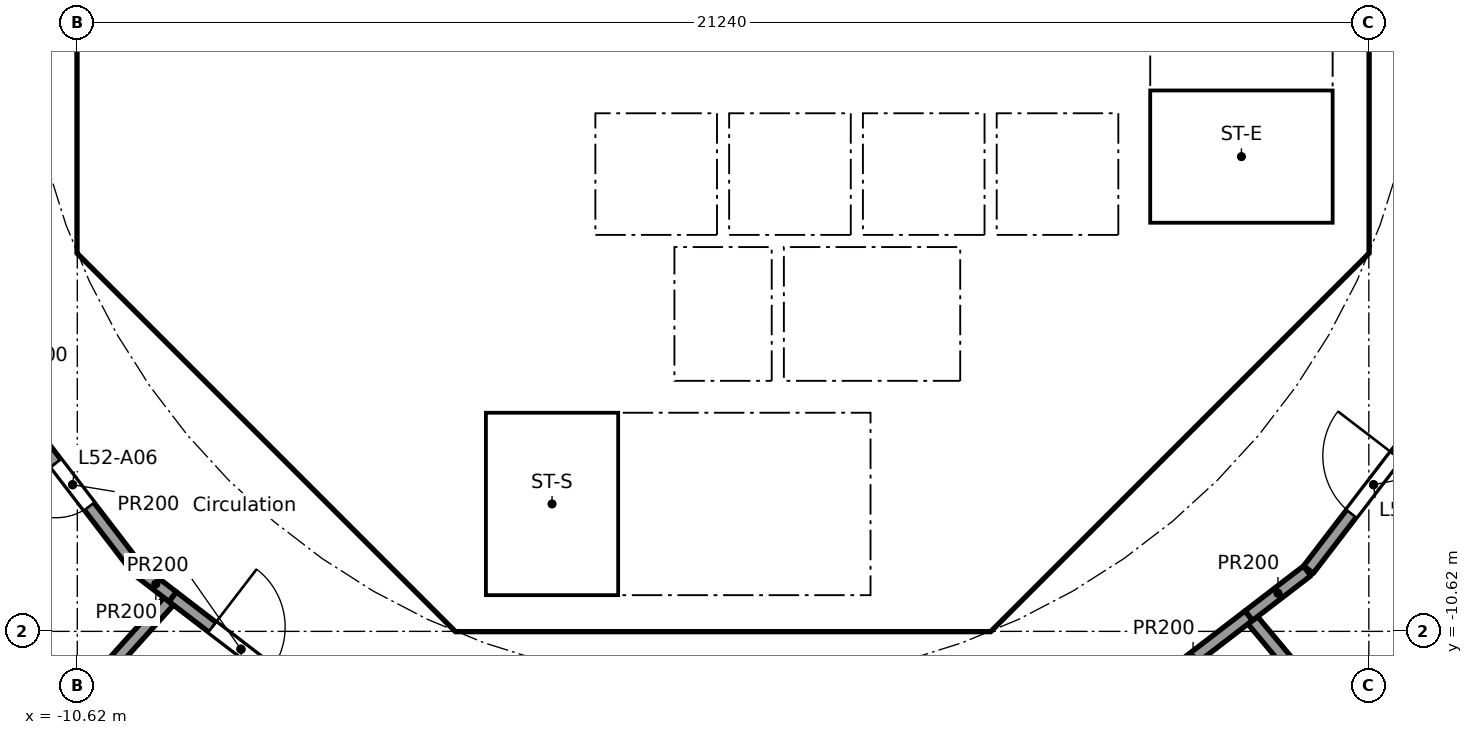
"""IFC4 building model, lengths in metres.
Left out: names, types, materials, properties, quantities, classifications, styles, units other than length and angle.
Written with IfcOpenShell. Run it as: python <this file> out.ifc"""

import sys

from ifc_helpers import new_model, si_unit, direction, frame, frame_2d, origin, place, context, subcontext, project, spatial, polyline, rectangle, outline, extrude, element, fill, save


model = new_model("IFC4")
c1 = context("Model", 3, precision=1e-05, world=origin(), true_north=direction((0.0, 1.0)))
c2 = subcontext(c1, "Body", "Model", "MODEL_VIEW")
j1 = project(units=[si_unit("LENGTHUNIT", "METRE"), si_unit("PLANEANGLEUNIT", "RADIAN")], contexts=[c1])
p1 = place(None, origin())
s1 = spatial("IfcSite", under=j1, at=p1, CompositionType="ELEMENT")
p2 = place(p1, origin())
s2 = spatial("IfcBuilding", under=s1, at=p2, CompositionType="ELEMENT")
p3 = place(p2, frame((0.0, 0.0, 206.6)))
s3 = spatial("IfcBuildingStorey", under=s2, at=p3, CompositionType="ELEMENT", Elevation=206.6)
p4 = place(p3, frame((-10.325, 3.801, 0.0), z_axis=(0.0, 0.0, 1.0), x_axis=(0.0, -1.0, 0.0)))
e1 = element("IfcWall", 1, at=p4, inside=s3, PredefinedType="SHEAR", context=c2, shape_type="SweptSolid", body=[
    extrude(rectangle(XDim=7.602, YDim=0.6, at=frame_2d((3.801, 0.0))), origin(), (0.0, 0.0, 1.0), 5.34),
])
p5 = place(p4, frame((0.651, 0.0, 0.0)))
e2 = element("IfcOpeningElement", 2, at=p5, cuts=e1, PredefinedType="OPENING", context=c2, shape_type="SweptSolid", body=[
    extrude(rectangle(XDim=1.5, YDim=2.1, at=frame_2d((0.75, 1.05))), frame((0.0, 0.31, 0.0), z_axis=(0.0, -1.0, 0.0), x_axis=(1.0, 0.0, 0.0)), (0.0, 0.0, 1.0), 0.62),
])
p6 = place(p4, frame((5.451, 0.0, 0.0)))
e3 = element("IfcOpeningElement", 3, at=p6, cuts=e1, PredefinedType="OPENING", context=c2, shape_type="SweptSolid", body=[
    extrude(rectangle(XDim=1.5, YDim=2.1, at=frame_2d((0.75, 1.05))), frame((0.0, 0.31, 0.0), z_axis=(0.0, -1.0, 0.0), x_axis=(1.0, 0.0, 0.0)), (0.0, 0.0, 1.0), 0.62),
])
p7 = place(p3, frame((-9.988, -4.613, 0.0), z_axis=(0.0, 0.0, 1.0), x_axis=(0.707106781187, -0.707106781187, 0.0)))
e4 = element("IfcWall", 4, at=p7, inside=s3, PredefinedType="SHEAR", context=c2, shape_type="SweptSolid", body=[
    extrude(rectangle(XDim=7.602, YDim=0.6, at=frame_2d((3.801, 0.0))), origin(), (0.0, 0.0, 1.0), 5.34),
])
p8 = place(p7, frame((6.151, 0.0, 0.0)))
e5 = element("IfcOpeningElement", 5, at=p8, cuts=e4, PredefinedType="OPENING", context=c2, shape_type="SweptSolid", body=[
    extrude(rectangle(XDim=1.1, YDim=2.1, at=frame_2d((0.55, 1.05))), frame((0.0, 0.31, 0.0), z_axis=(0.0, -1.0, 0.0), x_axis=(1.0, 0.0, 0.0)), (0.0, 0.0, 1.0), 0.62),
])
p9 = place(p3, frame((4.613, -9.988, 0.0), z_axis=(0.0, 0.0, 1.0), x_axis=(0.707106781187, 0.707106781187, 0.0)))
e6 = element("IfcWall", 6, at=p9, inside=s3, PredefinedType="SHEAR", context=c2, shape_type="SweptSolid", body=[
    extrude(rectangle(XDim=7.602, YDim=0.6, at=frame_2d((3.801, 0.0))), origin(), (0.0, 0.0, 1.0), 5.34),
])
p10 = place(p9, frame((3.201, 0.0, 0.0)))
e7 = element("IfcOpeningElement", 7, at=p10, cuts=e6, PredefinedType="OPENING", context=c2, shape_type="SweptSolid", body=[
    extrude(rectangle(XDim=1.2, YDim=2.1, at=frame_2d((0.6, 1.05))), frame((0.0, 0.31, 0.0), z_axis=(0.0, -1.0, 0.0), x_axis=(1.0, 0.0, 0.0)), (0.0, 0.0, 1.0), 0.62),
])
p11 = place(p3, frame((4.0, -10.025, 0.0), z_axis=(0.0, 0.0, 1.0), x_axis=(0.0, 1.0, 0.0)))
e8 = element("IfcWall", 8, at=p11, inside=s3, PredefinedType="SOLIDWALL", context=c2, shape_type="SweptSolid", body=[
    extrude(rectangle(XDim=3.0, YDim=0.2, at=frame_2d((1.5, 0.0))), origin(), (0.0, 0.0, 1.0), 5.34),
])
p12 = place(p11, frame((0.975, 0.0, 0.0)))
e9 = element("IfcOpeningElement", 9, at=p12, cuts=e8, PredefinedType="OPENING", context=c2, shape_type="SweptSolid", body=[
    extrude(rectangle(XDim=1.1, YDim=2.1, at=frame_2d((0.55, 1.05))), frame((0.0, 0.11, 0.0), z_axis=(0.0, -1.0, 0.0), x_axis=(1.0, 0.0, 0.0)), (0.0, 0.0, 1.0), 0.22),
])
p13 = place(p3, frame((-5.8, -8.227, 0.0), z_axis=(0.0, 0.0, 1.0), x_axis=(0.0, 1.0, 0.0)))
e10 = element("IfcWall", 10, at=p13, inside=s3, PredefinedType="PARTITIONING", context=c2, shape_type="SweptSolid", body=[
    extrude(rectangle(XDim=3.927, YDim=0.15, at=frame_2d((1.963, 0.0))), origin(), (0.0, 0.0, 1.0), 5.34),
])
p14 = place(p13, frame((2.615, 0.0, 0.0)))
e11 = element("IfcOpeningElement", 11, at=p14, cuts=e10, PredefinedType="OPENING", context=c2, shape_type="SweptSolid", body=[
    extrude(rectangle(XDim=0.9, YDim=2.1, at=frame_2d((0.45, 1.05))), frame((0.0, 0.085, 0.0), z_axis=(0.0, -1.0, 0.0), x_axis=(1.0, 0.0, 0.0)), (0.0, 0.0, 1.0), 0.17),
])
p15 = place(p13, frame((0.539, 0.0, 0.0)))
e12 = element("IfcOpeningElement", 12, at=p15, cuts=e10, PredefinedType="OPENING", context=c2, shape_type="SweptSolid", body=[
    extrude(rectangle(XDim=0.9, YDim=2.1, at=frame_2d((0.45, 1.05))), frame((0.0, 0.085, 0.0), z_axis=(0.0, -1.0, 0.0), x_axis=(1.0, 0.0, 0.0)), (0.0, 0.0, 1.0), 0.17),
])
p16 = place(p3, frame((4.0, -6.5, 0.0), z_axis=(0.0, 0.0, 1.0), x_axis=(0.0, 1.0, 0.0)))
e13 = element("IfcWall", 13, at=p16, inside=s3, PredefinedType="SOLIDWALL", context=c2, shape_type="SweptSolid", body=[
    extrude(rectangle(XDim=2.2, YDim=0.2, at=frame_2d((1.1, 0.0))), origin(), (0.0, 0.0, 1.0), 5.34),
])
p17 = place(p16, frame((0.55, 0.0, 0.0)))
e14 = element("IfcOpeningElement", 14, at=p17, cuts=e13, PredefinedType="OPENING", context=c2, shape_type="SweptSolid", body=[
    extrude(rectangle(XDim=1.1, YDim=2.1, at=frame_2d((0.55, 1.05))), frame((0.0, 0.11, 0.0), z_axis=(0.0, -1.0, 0.0), x_axis=(1.0, 0.0, 0.0)), (0.0, 0.0, 1.0), 0.22),
])
p18 = place(p3, frame((-4.0, -6.5, 0.0), z_axis=(0.0, 0.0, 1.0), x_axis=(0.0, 1.0, 0.0)))
e15 = element("IfcWall", 15, at=p18, inside=s3, PredefinedType="SOLIDWALL", context=c2, shape_type="SweptSolid", body=[
    extrude(rectangle(XDim=2.2, YDim=0.2, at=frame_2d((1.1, 0.0))), origin(), (0.0, 0.0, 1.0), 5.34),
])
p19 = place(p18, frame((0.65, 0.0, 0.0)))
e16 = element("IfcOpeningElement", 16, at=p19, cuts=e15, PredefinedType="OPENING", context=c2, shape_type="SweptSolid", body=[
    extrude(rectangle(XDim=0.9, YDim=2.1, at=frame_2d((0.45, 1.05))), frame((0.0, 0.11, 0.0), z_axis=(0.0, -1.0, 0.0), x_axis=(1.0, 0.0, 0.0)), (0.0, 0.0, 1.0), 0.22),
])
p20 = place(p3, frame((-6.7, -2.0, 0.0), z_axis=(0.0, 0.0, 1.0), x_axis=(1.0, 0.0, 0.0)))
e17 = element("IfcWall", 17, at=p20, inside=s3, PredefinedType="SOLIDWALL", context=c2, shape_type="SweptSolid", body=[
    extrude(rectangle(XDim=13.4, YDim=0.2, at=frame_2d((6.7, 0.0))), origin(), (0.0, 0.0, 1.0), 5.34),
])
p21 = place(p20, frame((5.05, 0.0, 0.0)))
e18 = element("IfcOpeningElement", 18, at=p21, cuts=e17, PredefinedType="OPENING", context=c2, shape_type="SweptSolid", body=[
    extrude(rectangle(XDim=1.1, YDim=2.1, at=frame_2d((0.55, 1.05))), frame((0.0, 0.11, 0.0), z_axis=(0.0, -1.0, 0.0), x_axis=(1.0, 0.0, 0.0)), (0.0, 0.0, 1.0), 0.22),
])
p22 = place(p20, frame((7.25, 0.0, 0.0)))
e19 = element("IfcOpeningElement", 19, at=p22, cuts=e17, PredefinedType="OPENING", context=c2, shape_type="SweptSolid", body=[
    extrude(rectangle(XDim=1.1, YDim=2.1, at=frame_2d((0.55, 1.05))), frame((0.0, 0.11, 0.0), z_axis=(0.0, -1.0, 0.0), x_axis=(1.0, 0.0, 0.0)), (0.0, 0.0, 1.0), 0.22),
])
p23 = place(p20, frame((1.85, 0.0, 0.0)))
e20 = element("IfcOpeningElement", 20, at=p23, cuts=e17, PredefinedType="OPENING", context=c2, shape_type="SweptSolid", body=[
    extrude(rectangle(XDim=0.9, YDim=2.1, at=frame_2d((0.45, 1.05))), frame((0.0, 0.11, 0.0), z_axis=(0.0, -1.0, 0.0), x_axis=(1.0, 0.0, 0.0)), (0.0, 0.0, 1.0), 0.22),
])
p24 = place(p3, origin())
e21 = element("IfcWall", 21, at=p24, inside=s3, PredefinedType="SHEAR", context=c2, shape_type="SweptSolid", body=[
    extrude(outline(polyline([(-10.625, -3.801), (-10.025, -3.801), (-10.025, -4.152), (-9.776, -4.401), (-10.2, -4.825), (-10.625, -4.401), (-10.625, -3.801)])), origin(), (0.0, 0.0, 1.0), 5.34),
])
p25 = place(p3, origin())
e22 = element("IfcWall", 22, at=p25, inside=s3, PredefinedType="SHEAR", context=c2, shape_type="SweptSolid", body=[
    extrude(outline(polyline([(-4.152, -10.025), (4.152, -10.025), (4.401, -9.776), (4.825, -10.2), (4.401, -10.625), (-4.401, -10.625), (-4.825, -10.2), (-4.401, -9.776), (-4.152, -10.025)])), origin(), (0.0, 0.0, 1.0), 5.34),
])
p26 = place(p3, origin())
e23 = element("IfcWall", 23, at=p26, inside=s3, PredefinedType="SHEAR", context=c2, shape_type="SweptSolid", body=[
    extrude(outline(polyline([(9.776, -4.401), (10.025, -4.152), (10.025, -3.801), (10.025, 4.152), (9.776, 4.401), (10.2, 4.825), (10.625, 4.401), (10.625, -4.401), (10.2, -4.825), (9.776, -4.401)])), origin(), (0.0, 0.0, 1.0), 5.34),
])
for number, where, z_axis, x_axis in (
    (24, (-0.9, -6.5, 0.0), (0.0, 0.0, 1.0), (0.0, 1.0, 0.0)),
    (25, (0.9, -6.5, 0.0), (0.0, 0.0, 1.0), (0.0, 1.0, 0.0)),
):
    element("IfcWall", number, at=place(p3, frame(where, z_axis=z_axis, x_axis=x_axis)), inside=s3, PredefinedType="SOLIDWALL", context=c2, shape_type="SweptSolid", body=[
        extrude(rectangle(XDim=2.2, YDim=0.2, at=frame_2d((1.1, 0.0))), origin(), (0.0, 0.0, 1.0), 5.34),
    ])
p27 = place(p3, origin())
e26 = element("IfcWall", 26, at=p27, inside=s3, PredefinedType="SOLIDWALL", context=c2, shape_type="SweptSolid", body=[
    extrude(outline(polyline([(-6.7, -2.1), (-6.5, -2.1), (-6.5, -4.1), (-2.3, -4.1), (-2.3, -2.1), (-2.1, -2.1), (-2.1, -4.1), (-0.1, -4.1), (-0.1, -2.1), (0.1, -2.1), (0.1, -4.1), (2.1, -4.1), (2.1, -2.1), (2.3, -2.1), (2.3, -4.1), (4.3, -4.1), (4.3, -2.1), (4.5, -2.1), (4.5, -4.1), (6.5, -4.1), (6.5, -2.1), (6.7, -2.1), (6.7, -4.3), (-6.7, -4.3), (-6.7, -2.1)])), origin(), (0.0, 0.0, 1.0), 5.34),
])
p28 = place(p3, frame((-10.025, -4.0, 0.0), z_axis=(0.0, 0.0, 1.0), x_axis=(1.0, 0.0, 0.0)))
e27 = element("IfcWall", 27, at=p28, inside=s3, PredefinedType="PARTITIONING", context=c2, shape_type="SweptSolid", body=[
    extrude(rectangle(XDim=3.325, YDim=0.2, at=frame_2d((1.662, 0.0))), origin(), (0.0, 0.0, 1.0), 5.34),
])
p29 = place(p3, frame((-8.001, -6.1, 0.0), z_axis=(0.0, 0.0, 1.0), x_axis=(1.0, 0.0, 0.0)))
e28 = element("IfcWall", 28, at=p29, inside=s3, PredefinedType="PARTITIONING", context=c2, shape_type="SweptSolid", body=[
    extrude(rectangle(XDim=2.126, YDim=0.15, at=frame_2d((1.063, 0.0))), origin(), (0.0, 0.0, 1.0), 5.34),
])
p30 = place(p3, origin())
e29 = element("IfcWall", 29, at=p30, inside=s3, PredefinedType="SOLIDWALL", context=c2, shape_type="SweptSolid", body=[
    extrude(outline(polyline([(-3.9, -10.025), (-4.1, -10.025), (-4.1, -7.025), (-3.9, -7.025), (-3.9, -10.025)])), origin(), (0.0, 0.0, 1.0), 5.34),
])
p31 = place(p3, origin())
e30 = element("IfcWall", 30, at=p31, inside=s3, PredefinedType="SOLIDWALL", context=c2, shape_type="SweptSolid", body=[
    extrude(outline(polyline([(4.1, -7.025), (-4.1, -7.025), (-4.1, -6.5), (4.1, -6.5), (4.1, -7.025)])), origin(), (0.0, 0.0, 1.0), 5.34),
])
p32 = place(p3, origin())
e31 = element("IfcWall", 31, at=p32, inside=s3, PredefinedType="SOLIDWALL", context=c2, shape_type="SweptSolid", body=[
    extrude(outline(polyline([(7.025, -3.9), (6.7, -3.9), (6.7, 3.9), (7.025, 3.9), (7.025, -3.9)])), origin(), (0.0, 0.0, 1.0), 5.34),
])
p33 = place(p3, origin())
e32 = element("IfcWall", 32, at=p33, inside=s3, PredefinedType="SOLIDWALL", context=c2, shape_type="SweptSolid", body=[
    extrude(outline(polyline([(10.025, -4.1), (6.7, -4.1), (6.7, -3.9), (10.025, -3.9), (10.025, -4.1)])), origin(), (0.0, 0.0, 1.0), 5.34),
])
p34 = place(p3, frame((-9.626, -9.605, 0.0), z_axis=(0.0, 0.0, 1.0), x_axis=(-0.608697977542, 0.793402024283, 0.0)))
e33 = element("IfcWall", 33, at=p34, inside=s3, PredefinedType="PARTITIONING", context=c2, shape_type="SweptSolid", body=[
    extrude(rectangle(XDim=3.52, YDim=0.2, at=frame_2d((1.76, 0.0))), origin(), (0.0, 0.0, 1.0), 5.34),
])
p35 = place(p34, frame((1.31, 0.0, 0.0)))
e34 = element("IfcOpeningElement", 34, at=p35, cuts=e33, PredefinedType="OPENING", context=c2, shape_type="SweptSolid", body=[
    extrude(rectangle(XDim=0.9, YDim=2.1, at=frame_2d((0.45, 1.05))), frame((0.0, 0.11, 0.0), z_axis=(0.0, -1.0, 0.0), x_axis=(1.0, 0.0, 0.0)), (0.0, 0.0, 1.0), 0.22),
])
p36 = place(p3, frame((-9.117, -10.126, 0.0), z_axis=(0.0, 0.0, 1.0), x_axis=(-0.66912025522, -0.743154145554, 0.0)))
e35 = element("IfcWall", 35, at=p36, inside=s3, PredefinedType="PARTITIONING", context=c2, shape_type="SweptSolid", body=[
    extrude(rectangle(XDim=10.493, YDim=0.2, at=frame_2d((5.247, 0.0))), origin(), (0.0, 0.0, 1.0), 5.34),
])
p37 = place(p3, frame((-9.05, -10.051, 0.0), z_axis=(0.0, 0.0, 1.0), x_axis=(-0.793454504248, 0.608629566887, 0.0)))
e36 = element("IfcWall", 36, at=p37, inside=s3, PredefinedType="PARTITIONING", context=c2, shape_type="SweptSolid", body=[
    extrude(rectangle(XDim=0.699, YDim=0.2, at=frame_2d((0.349, 0.0))), origin(), (0.0, 0.0, 1.0), 5.34),
])
p38 = place(p3, frame((-6.812, -11.769, 0.0), z_axis=(0.0, 0.0, 1.0), x_axis=(-0.793389024662, 0.608714921409, 0.0)))
e37 = element("IfcWall", 37, at=p38, inside=s3, PredefinedType="PARTITIONING", context=c2, shape_type="SweptSolid", body=[
    extrude(rectangle(XDim=2.821, YDim=0.2, at=frame_2d((1.411, 0.0))), origin(), (0.0, 0.0, 1.0), 5.34),
])
p39 = place(p38, frame((0.803, 0.0, 0.0)))
e38 = element("IfcOpeningElement", 38, at=p39, cuts=e37, PredefinedType="OPENING", context=c2, shape_type="SweptSolid", body=[
    extrude(rectangle(XDim=1.2, YDim=2.1, at=frame_2d((0.6, 1.05))), frame((0.0, 0.11, 0.0), z_axis=(0.0, -1.0, 0.0), x_axis=(1.0, 0.0, 0.0)), (0.0, 0.0, 1.0), 0.22),
])
p40 = place(p3, frame((8.646, -10.361, 0.0), z_axis=(0.0, 0.0, 1.0), x_axis=(-0.793388779929, -0.60871524039, 0.0)))
e39 = element("IfcWall", 39, at=p40, inside=s3, PredefinedType="PARTITIONING", context=c2, shape_type="SweptSolid", body=[
    extrude(rectangle(XDim=2.312, YDim=0.2, at=frame_2d((1.156, 0.0))), origin(), (0.0, 0.0, 1.0), 5.34),
])
p41 = place(p3, frame((8.711, -10.438, 0.0), z_axis=(0.0, 0.0, 1.0), x_axis=(0.640724447671, -0.767770917759, 0.0)))
e40 = element("IfcWall", 40, at=p41, inside=s3, PredefinedType="PARTITIONING", context=c2, shape_type="SweptSolid", body=[
    extrude(rectangle(XDim=16.092, YDim=0.2, at=frame_2d((8.046, 0.0))), origin(), (0.0, 0.0, 1.0), 5.34),
])
p42 = place(p3, frame((9.605, -9.626, 0.0), z_axis=(0.0, 0.0, 1.0), x_axis=(-0.793427379392, -0.608664927223, 0.0)))
e41 = element("IfcWall", 41, at=p42, inside=s3, PredefinedType="PARTITIONING", context=c2, shape_type="SweptSolid", body=[
    extrude(rectangle(XDim=1.208, YDim=0.2, at=frame_2d((0.604, 0.0))), origin(), (0.0, 0.0, 1.0), 5.34),
])
p43 = place(p3, frame((11.769, -6.812, 0.0), z_axis=(0.0, 0.0, 1.0), x_axis=(-0.608697977542, -0.793402024283, 0.0)))
e42 = element("IfcWall", 42, at=p43, inside=s3, PredefinedType="PARTITIONING", context=c2, shape_type="SweptSolid", body=[
    extrude(rectangle(XDim=3.52, YDim=0.2, at=frame_2d((1.76, 0.0))), origin(), (0.0, 0.0, 1.0), 5.34),
])
p44 = place(p43, frame((1.16, 0.0, 0.0)))
e43 = element("IfcOpeningElement", 43, at=p44, cuts=e42, PredefinedType="OPENING", context=c2, shape_type="SweptSolid", body=[
    extrude(rectangle(XDim=1.2, YDim=2.1, at=frame_2d((0.6, 1.05))), frame((0.0, 0.11, 0.0), z_axis=(0.0, -1.0, 0.0), x_axis=(1.0, 0.0, 0.0)), (0.0, 0.0, 1.0), 0.22),
])
p45 = place(p21, origin())
e44 = element("IfcDoor", 44, at=p45, inside=s3, OperationType="DOUBLE_DOOR_SLIDING", PredefinedType="DOOR", context=c2, shape_type="SweptSolid", body=[
    extrude(rectangle(XDim=1.1, YDim=2.1, at=frame_2d((0.55, 1.05))), frame((0.0, 0.025, 0.0), z_axis=(0.0, -1.0, 0.0), x_axis=(1.0, 0.0, 0.0)), (0.0, 0.0, 1.0), 0.05),
])
fill(e18, e44)
p46 = place(p22, origin())
e45 = element("IfcDoor", 45, at=p46, inside=s3, OperationType="DOUBLE_DOOR_SLIDING", PredefinedType="DOOR", context=c2, shape_type="SweptSolid", body=[
    extrude(rectangle(XDim=1.1, YDim=2.1, at=frame_2d((0.55, 1.05))), frame((0.0, 0.025, 0.0), z_axis=(0.0, -1.0, 0.0), x_axis=(1.0, 0.0, 0.0)), (0.0, 0.0, 1.0), 0.05),
])
fill(e19, e45)
p47 = place(p17, origin())
e46 = element("IfcDoor", 46, at=p47, inside=s3, OperationType="DOUBLE_DOOR_SLIDING", PredefinedType="DOOR", context=c2, shape_type="SweptSolid", body=[
    extrude(rectangle(XDim=1.1, YDim=2.1, at=frame_2d((0.55, 1.05))), frame((0.0, 0.025, 0.0), z_axis=(0.0, -1.0, 0.0), x_axis=(1.0, 0.0, 0.0)), (0.0, 0.0, 1.0), 0.05),
])
fill(e14, e46)
p48 = place(p12, origin())
e47 = element("IfcDoor", 47, at=p48, inside=s3, OperationType="SINGLE_SWING_RIGHT", PredefinedType="DOOR", context=c2, shape_type="SweptSolid", body=[
    extrude(rectangle(XDim=1.1, YDim=2.1, at=frame_2d((0.55, 1.05))), frame((0.0, 0.025, 0.0), z_axis=(0.0, -1.0, 0.0), x_axis=(1.0, 0.0, 0.0)), (0.0, 0.0, 1.0), 0.05),
])
fill(e9, e47)
p49 = place(p14, origin())
e48 = element("IfcDoor", 48, at=p49, inside=s3, OperationType="SINGLE_SWING_RIGHT", PredefinedType="DOOR", context=c2, shape_type="SweptSolid", body=[
    extrude(rectangle(XDim=0.9, YDim=2.1, at=frame_2d((0.45, 1.05))), frame((0.0, 0.025, 0.0), z_axis=(0.0, -1.0, 0.0), x_axis=(1.0, 0.0, 0.0)), (0.0, 0.0, 1.0), 0.05),
])
fill(e11, e48)
p50 = place(p15, origin())
e49 = element("IfcDoor", 49, at=p50, inside=s3, OperationType="SINGLE_SWING_RIGHT", PredefinedType="DOOR", context=c2, shape_type="SweptSolid", body=[
    extrude(rectangle(XDim=0.9, YDim=2.1, at=frame_2d((0.45, 1.05))), frame((0.0, 0.025, 0.0), z_axis=(0.0, -1.0, 0.0), x_axis=(1.0, 0.0, 0.0)), (0.0, 0.0, 1.0), 0.05),
])
fill(e12, e49)
p51 = place(p19, frame((0.9, 0.0, 0.0), x_axis=(-1.0, 0.0, 0.0)))
e50 = element("IfcDoor", 50, at=p51, inside=s3, OperationType="SINGLE_SWING_LEFT", PredefinedType="DOOR", context=c2, shape_type="SweptSolid", body=[
    extrude(rectangle(XDim=0.9, YDim=2.1, at=frame_2d((0.45, 1.05))), frame((0.0, 0.025, 0.0), z_axis=(0.0, -1.0, 0.0), x_axis=(1.0, 0.0, 0.0)), (0.0, 0.0, 1.0), 0.05),
])
fill(e16, e50)
p52 = place(p23, frame((0.9, 0.0, 0.0), x_axis=(-1.0, 0.0, 0.0)))
e51 = element("IfcDoor", 51, at=p52, inside=s3, OperationType="SINGLE_SWING_RIGHT", PredefinedType="DOOR", context=c2, shape_type="SweptSolid", body=[
    extrude(rectangle(XDim=0.9, YDim=2.1, at=frame_2d((0.45, 1.05))), frame((0.0, 0.025, 0.0), z_axis=(0.0, -1.0, 0.0), x_axis=(1.0, 0.0, 0.0)), (0.0, 0.0, 1.0), 0.05),
])
fill(e20, e51)
p53 = place(p10, origin())
e52 = element("IfcDoor", 52, at=p53, inside=s3, OperationType="SINGLE_SWING_LEFT", PredefinedType="DOOR", context=c2, shape_type="SweptSolid", body=[
    extrude(rectangle(XDim=1.2, YDim=2.1, at=frame_2d((0.6, 1.05))), frame((0.0, 0.025, 0.0), z_axis=(0.0, -1.0, 0.0), x_axis=(1.0, 0.0, 0.0)), (0.0, 0.0, 1.0), 0.05),
])
fill(e7, e52)
p54 = place(p6, origin())
e53 = element("IfcDoor", 53, at=p54, inside=s3, OperationType="DOUBLE_DOOR_SINGLE_SWING", PredefinedType="DOOR", context=c2, shape_type="SweptSolid", body=[
    extrude(rectangle(XDim=1.5, YDim=2.1, at=frame_2d((0.75, 1.05))), frame((0.0, 0.025, 0.0), z_axis=(0.0, -1.0, 0.0), x_axis=(1.0, 0.0, 0.0)), (0.0, 0.0, 1.0), 0.05),
])
fill(e3, e53)
p55 = place(p8, origin())
e54 = element("IfcDoor", 54, at=p55, inside=s3, OperationType="SINGLE_SWING_LEFT", PredefinedType="DOOR", context=c2, shape_type="SweptSolid", body=[
    extrude(rectangle(XDim=1.1, YDim=2.1, at=frame_2d((0.55, 1.05))), frame((0.0, 0.025, 0.0), z_axis=(0.0, -1.0, 0.0), x_axis=(1.0, 0.0, 0.0)), (0.0, 0.0, 1.0), 0.05),
])
fill(e5, e54)
p56 = place(p35, origin())
e55 = element("IfcDoor", 55, at=p56, inside=s3, OperationType="SINGLE_SWING_RIGHT", PredefinedType="DOOR", context=c2, shape_type="SweptSolid", body=[
    extrude(rectangle(XDim=0.9, YDim=2.1, at=frame_2d((0.45, 1.05))), frame((0.0, 0.025, 0.0), z_axis=(0.0, -1.0, 0.0), x_axis=(1.0, 0.0, 0.0)), (0.0, 0.0, 1.0), 0.05),
])
fill(e34, e55)
p57 = place(p39, frame((1.2, 0.0, 0.0), x_axis=(-1.0, 0.0, 0.0)))
e56 = element("IfcDoor", 56, at=p57, inside=s3, OperationType="SINGLE_SWING_LEFT", PredefinedType="DOOR", context=c2, shape_type="SweptSolid", body=[
    extrude(rectangle(XDim=1.2, YDim=2.1, at=frame_2d((0.6, 1.05))), frame((0.0, 0.025, 0.0), z_axis=(0.0, -1.0, 0.0), x_axis=(1.0, 0.0, 0.0)), (0.0, 0.0, 1.0), 0.05),
])
fill(e38, e56)
p58 = place(p44, frame((1.2, 0.0, 0.0), x_axis=(-1.0, 0.0, 0.0)))
e57 = element("IfcDoor", 57, at=p58, inside=s3, OperationType="SINGLE_SWING_RIGHT", PredefinedType="DOOR", context=c2, shape_type="SweptSolid", body=[
    extrude(rectangle(XDim=1.2, YDim=2.1, at=frame_2d((0.6, 1.05))), frame((0.0, 0.025, 0.0), z_axis=(0.0, -1.0, 0.0), x_axis=(1.0, 0.0, 0.0)), (0.0, 0.0, 1.0), 0.05),
])
fill(e43, e57)
save(model, sys.argv[1])
